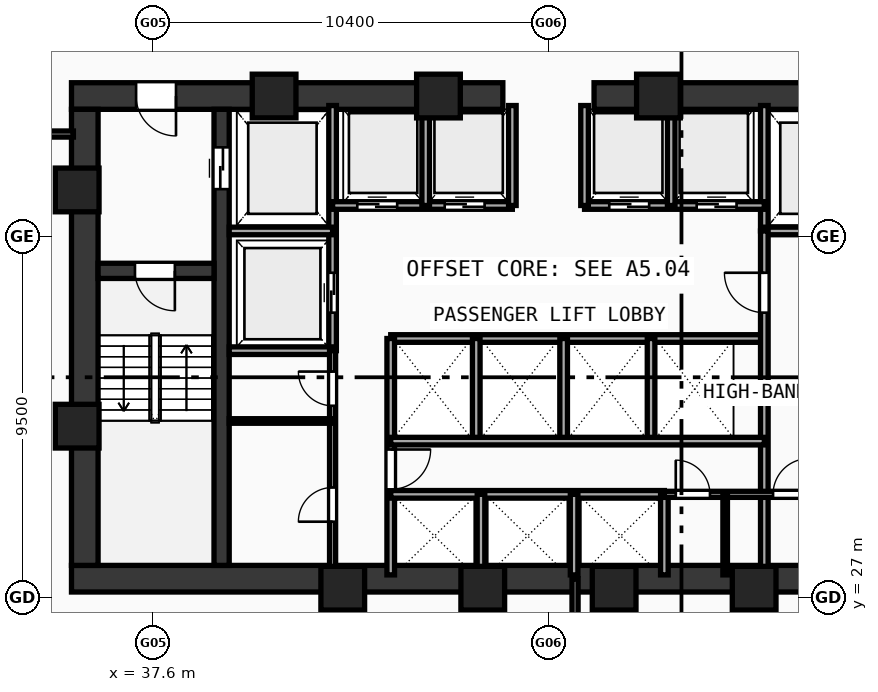
"""IFC4 building model, lengths in metres.
Left out: names, types, materials, properties, quantities, classifications, styles, units other than length and angle.
Written with IfcOpenShell. Run it as: python <this file> out.ifc"""

import sys

from ifc_helpers import new_model, si_unit, direction, frame, frame_2d, origin, origin_with_axes, origin_2d, place, context, subcontext, project, spatial, rectangle, hollow_rectangle, extrude, source, transform, mapped, element, fill, save


model = new_model("IFC4")
c1 = context("Model", 3, precision=1e-05, world=origin(), true_north=direction((0.0, 1.0)))
c2 = subcontext(c1, "Body", "Model", "MODEL_VIEW")
j1 = project(units=[si_unit("LENGTHUNIT", "METRE"), si_unit("PLANEANGLEUNIT", "RADIAN")], contexts=[c1])
p1 = place(None, origin())
s1 = spatial("IfcSite", under=j1, at=p1, CompositionType="ELEMENT")
p2 = place(p1, origin())
s2 = spatial("IfcBuilding", under=s1, at=p2, CompositionType="ELEMENT")
p3 = place(p2, frame((0.0, 0.0, 19.2)))
s3 = spatial("IfcBuildingStorey", under=s2, at=p3, CompositionType="ELEMENT", Elevation=19.2)
p4 = place(p3, frame((35.45, 27.5, 0.0), z_axis=(0.0, 0.0, 1.0), x_axis=(1.0, 0.0, 0.0)))
e1 = element("IfcWall", 1, at=p4, inside=s3, PredefinedType="SHEAR", context=c2, shape_type="SweptSolid", body=[
    extrude(rectangle(XDim=25.1, YDim=0.7, at=frame_2d((12.55, 0.0))), origin(), (0.0, 0.0, 1.0), 5.92),
])
p5 = place(p3, frame((35.45, 40.2, 0.0), z_axis=(0.0, 0.0, 1.0), x_axis=(1.0, 0.0, 0.0)))
e2 = element("IfcWall", 2, at=p5, inside=s3, PredefinedType="SHEAR", context=c2, shape_type="SweptSolid", body=[
    extrude(rectangle(XDim=11.35, YDim=0.7, at=frame_2d((5.675, 0.0))), origin(), (0.0, 0.0, 1.0), 5.92),
])
p6 = place(p5, frame((1.7, 0.0, 0.0)))
e3 = element("IfcOpeningElement", 3, at=p6, cuts=e2, PredefinedType="OPENING", context=c2, shape_type="SweptSolid", body=[
    extrude(rectangle(XDim=1.05, YDim=2.1, at=frame_2d((0.525, 1.05))), frame((0.0, 0.36, 0.0), z_axis=(0.0, -1.0, 0.0), x_axis=(1.0, 0.0, 0.0)), (0.0, 0.0, 1.0), 0.72),
])
p7 = place(p3, frame((49.2, 40.2, 0.0), z_axis=(0.0, 0.0, 1.0), x_axis=(1.0, 0.0, 0.0)))
e4 = element("IfcWall", 4, at=p7, inside=s3, PredefinedType="SHEAR", context=c2, shape_type="SweptSolid", body=[
    extrude(rectangle(XDim=11.35, YDim=0.7, at=frame_2d((5.675, 0.0))), origin(), (0.0, 0.0, 1.0), 5.92),
])
p8 = place(p7, frame((8.6, 0.0, 0.0)))
e5 = element("IfcOpeningElement", 5, at=p8, cuts=e4, PredefinedType="OPENING", context=c2, shape_type="SweptSolid", body=[
    extrude(rectangle(XDim=1.05, YDim=2.1, at=frame_2d((0.525, 1.05))), frame((0.0, 0.36, 0.0), z_axis=(0.0, -1.0, 0.0), x_axis=(1.0, 0.0, 0.0)), (0.0, 0.0, 1.0), 0.72),
])
p9 = place(p3, frame((35.8, 27.85, 0.0), z_axis=(0.0, 0.0, 1.0), x_axis=(0.0, 1.0, 0.0)))
e6 = element("IfcWall", 6, at=p9, inside=s3, PredefinedType="SHEAR", context=c2, shape_type="SweptSolid", body=[
    extrude(rectangle(XDim=12.0, YDim=0.7, at=frame_2d((6.0, 0.0))), origin(), (0.0, 0.0, 1.0), 5.92),
])
p10 = place(p3, frame((39.4, 27.85, 0.0), z_axis=(0.0, 0.0, 1.0), x_axis=(0.0, 1.0, 0.0)))
e7 = element("IfcWall", 7, at=p10, inside=s3, PredefinedType="SHEAR", context=c2, shape_type="SweptSolid", body=[
    extrude(rectangle(XDim=12.0, YDim=0.4, at=frame_2d((6.0, 0.0))), origin(), (0.0, 0.0, 1.0), 5.92),
])
p11 = place(p10, frame((9.9, 0.0, 0.0)))
e8 = element("IfcOpeningElement", 8, at=p11, cuts=e7, PredefinedType="OPENING", context=c2, shape_type="SweptSolid", body=[
    extrude(rectangle(XDim=1.1, YDim=2.1, at=frame_2d((0.55, 1.05))), frame((0.0, 0.21, 0.0), z_axis=(0.0, -1.0, 0.0), x_axis=(1.0, 0.0, 0.0)), (0.0, 0.0, 1.0), 0.42),
])
p12 = place(p3, frame((36.15, 35.6, 0.0), z_axis=(0.0, 0.0, 1.0), x_axis=(1.0, 0.0, 0.0)))
e9 = element("IfcWall", 9, at=p12, inside=s3, PredefinedType="SHEAR", context=c2, shape_type="SweptSolid", body=[
    extrude(rectangle(XDim=3.05, YDim=0.4, at=frame_2d((1.525, 0.0))), origin(), (0.0, 0.0, 1.0), 5.92),
])
p13 = place(p12, frame((0.97, 0.0, 0.0)))
e10 = element("IfcOpeningElement", 10, at=p13, cuts=e9, PredefinedType="OPENING", context=c2, shape_type="SweptSolid", body=[
    extrude(rectangle(XDim=1.05, YDim=2.1, at=frame_2d((0.525, 1.05))), frame((0.0, 0.21, 0.0), z_axis=(0.0, -1.0, 0.0), x_axis=(1.0, 0.0, 0.0)), (0.0, 0.0, 1.0), 0.42),
])
m1 = source(origin(), c2, "Body", "SweptSolid", [
    extrude(hollow_rectangle(XDim=1.15, YDim=1.15, WallThickness=0.048, at=origin_2d()), origin(), (0.0, 0.0, 1.0), 6.2),
])
for number, where, z_axis, x_axis in (
    (11, (42.588, 27.25, -0.28), (0.0, 0.0, 1.0), (1.0, 0.0, 0.0)),
    (12, (46.272, 27.25, -0.28), (0.0, 0.0, 1.0), (1.0, 0.0, 0.0)),
    (13, (49.729, 27.25, -0.28), (0.0, 0.0, 1.0), (1.0, 0.0, 0.0)),
    (14, (53.412, 27.25, -0.28), (0.0, 0.0, 1.0), (1.0, 0.0, 0.0)),
    (15, (50.894, 40.2, -0.28), (0.0, 0.0, 1.0), (1.0, 0.0, 0.0)),
    (16, (45.106, 40.2, -0.28), (0.0, 0.0, 1.0), (1.0, 0.0, 0.0)),
    (17, (40.781, 40.2, -0.28), (0.0, 0.0, 1.0), (1.0, 0.0, 0.0)),
    (18, (35.6, 37.729, -0.28), (0.0, 0.0, 1.0), (1.0, 0.0, 0.0)),
    (19, (35.6, 31.513, -0.28), (0.0, 0.0, 1.0), (1.0, 0.0, 0.0)),
):
    element("IfcColumn", number, at=place(p3, frame(where, z_axis=z_axis, x_axis=x_axis)), inside=s3, PredefinedType="COLUMN", context=c2, shape_type="MappedRepresentation", body=[
        mapped(m1, transform((0.0, 0.0, 0.0), scale=1.0)),
    ])
p14 = place(p3, frame((42.32, 33.5, 0.0), z_axis=(0.0, 0.0, 1.0), x_axis=(0.0, 1.0, 0.0)))
e20 = element("IfcWall", 20, at=p14, inside=s3, PredefinedType="SOLIDWALL", context=c2, shape_type="SweptSolid", body=[
    extrude(rectangle(XDim=6.45, YDim=0.2, at=frame_2d((3.225, 0.0))), origin(), (0.0, 0.0, 1.0), 5.92),
])
p15 = place(p14, frame((1.0, 0.0, 0.0)))
e21 = element("IfcOpeningElement", 21, at=p15, cuts=e20, PredefinedType="OPENING", context=c2, shape_type="SweptSolid", body=[
    extrude(rectangle(XDim=1.05, YDim=2.1, at=frame_2d((0.525, 1.05))), frame((0.0, 0.11, 0.0), z_axis=(0.0, -1.0, 0.0), x_axis=(1.0, 0.0, 0.0)), (0.0, 0.0, 1.0), 0.22),
])
for number, where, z_axis, x_axis in (
    (22, (39.6, 36.65, 0.0), (0.0, 0.0, 1.0), (1.0, 0.0, 0.0)),
    (23, (39.6, 33.5, 0.0), (0.0, 0.0, 1.0), (1.0, 0.0, 0.0)),
):
    element("IfcWall", number, at=place(p3, frame(where, z_axis=z_axis, x_axis=x_axis)), inside=s3, PredefinedType="SOLIDWALL", context=c2, shape_type="SweptSolid", body=[
        extrude(rectangle(XDim=2.72, YDim=0.2, at=frame_2d((1.36, 0.0))), origin(), (0.0, 0.0, 1.0), 5.92),
    ])
p16 = place(p3, frame((53.68, 36.65, 0.0), z_axis=(0.0, 0.0, 1.0), x_axis=(0.0, 1.0, 0.0)))
e24 = element("IfcWall", 24, at=p16, inside=s3, PredefinedType="SOLIDWALL", context=c2, shape_type="SweptSolid", body=[
    extrude(rectangle(XDim=3.3, YDim=0.2, at=frame_2d((1.65, 0.0))), origin(), (0.0, 0.0, 1.0), 5.92),
])
p17 = place(p3, frame((53.68, 36.65, 0.0), z_axis=(0.0, 0.0, 1.0), x_axis=(1.0, 0.0, 0.0)))
e25 = element("IfcWall", 25, at=p17, inside=s3, PredefinedType="SOLIDWALL", context=c2, shape_type="SweptSolid", body=[
    extrude(rectangle(XDim=2.72, YDim=0.2, at=frame_2d((1.36, 0.0))), origin(), (0.0, 0.0, 1.0), 5.92),
])
p18 = place(p3, frame((42.32, 37.32, 0.0), z_axis=(0.0, 0.0, 1.0), x_axis=(1.0, 0.0, 0.0)))
e26 = element("IfcWall", 26, at=p18, inside=s3, PredefinedType="SOLIDWALL", context=c2, shape_type="SweptSolid", body=[
    extrude(rectangle(XDim=4.73, YDim=0.2, at=frame_2d((2.365, 0.0))), origin(), (0.0, 0.0, 1.0), 5.92),
])
p19 = place(p18, frame((0.65, 0.0, 0.0)))
e27 = element("IfcOpeningElement", 27, at=p19, cuts=e26, PredefinedType="OPENING", context=c2, shape_type="SweptSolid", body=[
    extrude(rectangle(XDim=1.05, YDim=2.1, at=frame_2d((0.525, 1.05))), frame((0.0, 0.11, 0.0), z_axis=(0.0, -1.0, 0.0), x_axis=(1.0, 0.0, 0.0)), (0.0, 0.0, 1.0), 0.22),
])
p20 = place(p18, frame((2.95, 0.0, 0.0)))
e28 = element("IfcOpeningElement", 28, at=p20, cuts=e26, PredefinedType="OPENING", context=c2, shape_type="SweptSolid", body=[
    extrude(rectangle(XDim=1.05, YDim=2.1, at=frame_2d((0.525, 1.05))), frame((0.0, 0.11, 0.0), z_axis=(0.0, -1.0, 0.0), x_axis=(1.0, 0.0, 0.0)), (0.0, 0.0, 1.0), 0.22),
])
p21 = place(p3, frame((48.95, 37.32, 0.0), z_axis=(0.0, 0.0, 1.0), x_axis=(1.0, 0.0, 0.0)))
e29 = element("IfcWall", 29, at=p21, inside=s3, PredefinedType="SOLIDWALL", context=c2, shape_type="SweptSolid", body=[
    extrude(rectangle(XDim=4.73, YDim=0.2, at=frame_2d((2.365, 0.0))), origin(), (0.0, 0.0, 1.0), 5.92),
])
p22 = place(p21, frame((0.65, 0.0, 0.0)))
e30 = element("IfcOpeningElement", 30, at=p22, cuts=e29, PredefinedType="OPENING", context=c2, shape_type="SweptSolid", body=[
    extrude(rectangle(XDim=1.05, YDim=2.1, at=frame_2d((0.525, 1.05))), frame((0.0, 0.11, 0.0), z_axis=(0.0, -1.0, 0.0), x_axis=(1.0, 0.0, 0.0)), (0.0, 0.0, 1.0), 0.22),
])
p23 = place(p21, frame((2.95, 0.0, 0.0)))
e31 = element("IfcOpeningElement", 31, at=p23, cuts=e29, PredefinedType="OPENING", context=c2, shape_type="SweptSolid", body=[
    extrude(rectangle(XDim=1.05, YDim=2.1, at=frame_2d((0.525, 1.05))), frame((0.0, 0.11, 0.0), z_axis=(0.0, -1.0, 0.0), x_axis=(1.0, 0.0, 0.0)), (0.0, 0.0, 1.0), 0.22),
])
for number, where, z_axis, x_axis in (
    (32, (47.05, 37.32, 0.0), (0.0, 0.0, 1.0), (0.0, 1.0, 0.0)),
    (33, (48.95, 37.32, 0.0), (0.0, 0.0, 1.0), (0.0, 1.0, 0.0)),
):
    element("IfcWall", number, at=place(p3, frame(where, z_axis=z_axis, x_axis=x_axis)), inside=s3, PredefinedType="SOLIDWALL", context=c2, shape_type="SweptSolid", body=[
        extrude(rectangle(XDim=2.63, YDim=0.2, at=frame_2d((1.315, 0.0))), origin(), (0.0, 0.0, 1.0), 5.92),
    ])
for number, where, z_axis, x_axis in (
    (34, (44.77, 37.32, 0.0), (0.0, 0.0, 1.0), (0.0, 1.0, 0.0)),
    (35, (51.23, 37.32, 0.0), (0.0, 0.0, 1.0), (0.0, 1.0, 0.0)),
):
    element("IfcWall", number, at=place(p3, frame(where, z_axis=z_axis, x_axis=x_axis)), inside=s3, PredefinedType="SOLIDWALL", context=c2, shape_type="SweptSolid", body=[
        extrude(rectangle(XDim=2.63, YDim=0.2, at=frame_2d((1.315, 0.0))), origin(), (0.0, 0.0, 1.0), 2.42),
    ])
p24 = place(p3, frame((43.85, 33.82, 0.0), z_axis=(0.0, 0.0, 1.0), x_axis=(1.0, 0.0, 0.0)))
e36 = element("IfcWall", 36, at=p24, inside=s3, PredefinedType="SOLIDWALL", context=c2, shape_type="SweptSolid", body=[
    extrude(rectangle(XDim=9.83, YDim=0.2, at=frame_2d((4.915, 0.0))), origin(), (0.0, 0.0, 1.0), 5.92),
])
p25 = place(p3, frame((43.85, 27.6, 0.0), z_axis=(0.0, 0.0, 1.0), x_axis=(0.0, 1.0, 0.0)))
e37 = element("IfcWall", 37, at=p25, inside=s3, PredefinedType="SOLIDWALL", context=c2, shape_type="SweptSolid", body=[
    extrude(rectangle(XDim=6.22, YDim=0.2, at=frame_2d((3.11, 0.0))), origin(), (0.0, 0.0, 1.0), 5.92),
])
p26 = place(p25, frame((2.25, 0.0, 0.0)))
e38 = element("IfcOpeningElement", 38, at=p26, cuts=e37, PredefinedType="OPENING", context=c2, shape_type="SweptSolid", body=[
    extrude(rectangle(XDim=1.05, YDim=2.1, at=frame_2d((0.525, 1.05))), frame((0.0, 0.11, 0.0), z_axis=(0.0, -1.0, 0.0), x_axis=(1.0, 0.0, 0.0)), (0.0, 0.0, 1.0), 0.22),
])
p27 = place(p3, frame((53.68, 27.6, 0.0), z_axis=(0.0, 0.0, 1.0), x_axis=(0.0, 1.0, 0.0)))
e39 = element("IfcWall", 39, at=p27, inside=s3, PredefinedType="SOLIDWALL", context=c2, shape_type="SweptSolid", body=[
    extrude(rectangle(XDim=9.05, YDim=0.2, at=frame_2d((4.525, 0.0))), origin(), (0.0, 0.0, 1.0), 2.42),
])
p28 = place(p27, frame((6.9, 0.0, 0.0)))
e40 = element("IfcOpeningElement", 40, at=p28, cuts=e39, PredefinedType="OPENING", context=c2, shape_type="SweptSolid", body=[
    extrude(rectangle(XDim=1.05, YDim=2.1, at=frame_2d((0.525, 1.05))), frame((0.0, 0.11, 0.0), z_axis=(0.0, -1.0, 0.0), x_axis=(1.0, 0.0, 0.0)), (0.0, 0.0, 1.0), 0.22),
])
for number, where, z_axis, x_axis in (
    (41, (46.1, 31.12, 0.0), (0.0, 0.0, 1.0), (0.0, 1.0, 0.0)),
    (42, (48.4, 31.12, 0.0), (0.0, 0.0, 1.0), (0.0, 1.0, 0.0)),
    (43, (50.7, 31.12, 0.0), (0.0, 0.0, 1.0), (0.0, 1.0, 0.0)),
):
    element("IfcWall", number, at=place(p3, frame(where, z_axis=z_axis, x_axis=x_axis)), inside=s3, PredefinedType="SOLIDWALL", context=c2, shape_type="SweptSolid", body=[
        extrude(rectangle(XDim=2.7, YDim=0.2, at=frame_2d((1.35, 0.0))), origin(), (0.0, 0.0, 1.0), 5.92),
    ])
p29 = place(p3, frame((43.85, 29.72, 0.0), z_axis=(0.0, 0.0, 1.0), x_axis=(1.0, 0.0, 0.0)))
e44 = element("IfcWall", 44, at=p29, inside=s3, PredefinedType="SOLIDWALL", context=c2, shape_type="SweptSolid", body=[
    extrude(rectangle(XDim=7.2, YDim=0.2, at=frame_2d((3.6, 0.0))), origin(), (0.0, 0.0, 1.0), 5.92),
])
p30 = place(p3, frame((51.05, 27.6, 0.0), z_axis=(0.0, 0.0, 1.0), x_axis=(0.0, 1.0, 0.0)))
e45 = element("IfcWall", 45, at=p30, inside=s3, PredefinedType="SOLIDWALL", context=c2, shape_type="SweptSolid", body=[
    extrude(rectangle(XDim=2.12, YDim=0.2, at=frame_2d((1.06, 0.0))), origin(), (0.0, 0.0, 1.0), 5.92),
])
p31 = place(p3, frame((43.85, 31.12, 0.0), z_axis=(0.0, 0.0, 1.0), x_axis=(1.0, 0.0, 0.0)))
e46 = element("IfcWall", 46, at=p31, inside=s3, PredefinedType="SOLIDWALL", context=c2, shape_type="SweptSolid", body=[
    extrude(rectangle(XDim=9.83, YDim=0.2, at=frame_2d((4.915, 0.0))), origin(), (0.0, 0.0, 1.0), 5.92),
])
p32 = place(p3, frame((46.225, 27.6, 0.0), z_axis=(0.0, 0.0, 1.0), x_axis=(0.0, 1.0, 0.0)))
e47 = element("IfcWall", 47, at=p32, inside=s3, PredefinedType="SOLIDWALL", context=c2, shape_type="SweptSolid", body=[
    extrude(rectangle(XDim=2.12, YDim=0.2, at=frame_2d((1.06, 0.0))), origin(), (0.0, 0.0, 1.0), 2.42),
])
p33 = place(p3, frame((48.675, 27.6, 0.0), z_axis=(0.0, 0.0, 1.0), x_axis=(0.0, 1.0, 0.0)))
e48 = element("IfcWall", 48, at=p33, inside=s3, PredefinedType="SOLIDWALL", context=c2, shape_type="SweptSolid", body=[
    extrude(rectangle(XDim=2.12, YDim=0.2, at=frame_2d((1.06, 0.0))), origin(), (0.0, 0.0, 1.0), 5.92),
])
p34 = place(p3, frame((42.32, 27.6, 0.0), z_axis=(0.0, 0.0, 1.0), x_axis=(0.0, 1.0, 0.0)))
e49 = element("IfcWall", 49, at=p34, inside=s3, PredefinedType="PARTITIONING", context=c2, shape_type="SweptSolid", body=[
    extrude(rectangle(XDim=5.9, YDim=0.16, at=frame_2d((2.95, 0.0))), origin(), (0.0, 0.0, 1.0), 2.42),
])
p35 = place(p34, frame((1.4, 0.0, 0.0)))
e50 = element("IfcOpeningElement", 50, at=p35, cuts=e49, PredefinedType="OPENING", context=c2, shape_type="SweptSolid", body=[
    extrude(rectangle(XDim=0.9, YDim=2.1, at=frame_2d((0.45, 1.05))), frame((0.0, 0.09, 0.0), z_axis=(0.0, -1.0, 0.0), x_axis=(1.0, 0.0, 0.0)), (0.0, 0.0, 1.0), 0.18),
])
p36 = place(p34, frame((4.45, 0.0, 0.0)))
e51 = element("IfcOpeningElement", 51, at=p36, cuts=e49, PredefinedType="OPENING", context=c2, shape_type="SweptSolid", body=[
    extrude(rectangle(XDim=0.9, YDim=2.1, at=frame_2d((0.45, 1.05))), frame((0.0, 0.09, 0.0), z_axis=(0.0, -1.0, 0.0), x_axis=(1.0, 0.0, 0.0)), (0.0, 0.0, 1.0), 0.18),
])
p37 = place(p3, frame((51.05, 29.72, 0.0), z_axis=(0.0, 0.0, 1.0), x_axis=(1.0, 0.0, 0.0)))
e52 = element("IfcWall", 52, at=p37, inside=s3, PredefinedType="PARTITIONING", context=c2, shape_type="SweptSolid", body=[
    extrude(rectangle(XDim=4.07, YDim=0.16, at=frame_2d((2.035, 0.0))), origin(), (0.0, 0.0, 1.0), 5.92),
])
p38 = place(p37, frame((0.3, 0.0, 0.0)))
e53 = element("IfcOpeningElement", 53, at=p38, cuts=e52, PredefinedType="OPENING", context=c2, shape_type="SweptSolid", body=[
    extrude(rectangle(XDim=0.9, YDim=2.1, at=frame_2d((0.45, 1.05))), frame((0.0, 0.09, 0.0), z_axis=(0.0, -1.0, 0.0), x_axis=(1.0, 0.0, 0.0)), (0.0, 0.0, 1.0), 0.18),
])
p39 = place(p37, frame((2.86, 0.0, 0.0)))
e54 = element("IfcOpeningElement", 54, at=p39, cuts=e52, PredefinedType="OPENING", context=c2, shape_type="SweptSolid", body=[
    extrude(rectangle(XDim=0.94, YDim=2.1, at=frame_2d((0.47, 1.05))), frame((0.0, 0.09, 0.0), z_axis=(0.0, -1.0, 0.0), x_axis=(1.0, 0.0, 0.0)), (0.0, 0.0, 1.0), 0.18),
])
p40 = place(p3, frame((39.6, 31.65, 0.0), z_axis=(0.0, 0.0, 1.0), x_axis=(1.0, 0.0, 0.0)))
e55 = element("IfcWall", 55, at=p40, inside=s3, PredefinedType="PARTITIONING", context=c2, shape_type="SweptSolid", body=[
    extrude(rectangle(XDim=2.72, YDim=0.12, at=frame_2d((1.36, 0.0))), origin(), (0.0, 0.0, 1.0), 5.92),
])
p41 = place(p3, frame((52.65, 27.6, 0.0), z_axis=(0.0, 0.0, 1.0), x_axis=(0.0, 1.0, 0.0)))
e56 = element("IfcWall", 56, at=p41, inside=s3, PredefinedType="PARTITIONING", context=c2, shape_type="SweptSolid", body=[
    extrude(rectangle(XDim=2.12, YDim=0.12, at=frame_2d((1.06, 0.0))), origin(), (0.0, 0.0, 1.0), 5.92),
])
p42 = place(p3, frame((32.7, 39.2, 0.0), z_axis=(0.0, 0.0, 1.0), x_axis=(1.0, 0.0, 0.0)))
e57 = element("IfcWall", 57, at=p42, inside=s3, PredefinedType="PARTITIONING", context=c2, shape_type="SweptSolid", body=[
    extrude(rectangle(XDim=2.8, YDim=0.16, at=frame_2d((1.4, 0.0))), origin(), (0.0, 0.0, 1.0), 2.42),
])
p43 = place(p3, frame((48.7, 12.45, 0.0), z_axis=(0.0, 0.0, 1.0), x_axis=(0.0, 1.0, 0.0)))
e58 = element("IfcWall", 58, at=p43, inside=s3, PredefinedType="PARTITIONING", context=c2, shape_type="SweptSolid", body=[
    extrude(rectangle(XDim=15.05, YDim=0.16, at=frame_2d((7.525, 0.0))), origin(), (0.0, 0.0, 1.0), 5.22),
])
m2 = source(origin(), c2, "Body", "SweptSolid", [
    extrude(rectangle(XDim=1.05, YDim=2.1, at=frame_2d((0.525, 1.05))), frame((0.0, 0.025, 0.0), z_axis=(0.0, -1.0, 0.0), x_axis=(1.0, 0.0, 0.0)), (0.0, 0.0, 1.0), 0.05),
])
p44 = place(p13, frame((1.05, 0.0, 0.0), z_axis=(0.0, 0.0, 1.0), x_axis=(-1.0, 0.0, 0.0)))
e59 = element("IfcDoor", 59, at=p44, inside=s3, OperationType="SINGLE_SWING_LEFT", PredefinedType="DOOR", context=c2, shape_type="MappedRepresentation", body=[
    mapped(m2, transform((0.0, 0.0, 0.0), scale=1.0)),
])
fill(e10, e59)
p45 = place(p6, frame((1.05, 0.0, 0.0), z_axis=(0.0, 0.0, 1.0), x_axis=(-1.0, 0.0, 0.0)))
e60 = element("IfcDoor", 60, at=p45, inside=s3, OperationType="SINGLE_SWING_LEFT", PredefinedType="DOOR", context=c2, shape_type="MappedRepresentation", body=[
    mapped(m2, transform((0.0, 0.0, 0.0), scale=1.0)),
])
fill(e3, e60)
m3 = source(origin(), c2, "Body", "SweptSolid", [
    extrude(rectangle(XDim=1.1, YDim=2.1, at=frame_2d((0.55, 1.05))), frame((0.0, 0.025, 0.0), z_axis=(0.0, -1.0, 0.0), x_axis=(1.0, 0.0, 0.0)), (0.0, 0.0, 1.0), 0.05),
])
p46 = place(p11, frame((1.1, 0.0, 0.0), z_axis=(0.0, 0.0, 1.0), x_axis=(-1.0, 0.0, 0.0)))
e61 = element("IfcDoor", 61, at=p46, inside=s3, OperationType="DOUBLE_DOOR_SLIDING", PredefinedType="DOOR", context=c2, shape_type="MappedRepresentation", body=[
    mapped(m3, transform((0.0, 0.0, 0.0), scale=1.0)),
])
fill(e8, e61)
p47 = place(p15, origin_with_axes())
e62 = element("IfcDoor", 62, at=p47, inside=s3, OperationType="DOUBLE_DOOR_SLIDING", PredefinedType="DOOR", context=c2, shape_type="MappedRepresentation", body=[
    mapped(m2, transform((0.0, 0.0, 0.0), scale=1.0)),
])
fill(e21, e62)
p48 = place(p19, frame((1.05, 0.0, 0.0), z_axis=(0.0, 0.0, 1.0), x_axis=(-1.0, 0.0, 0.0)))
e63 = element("IfcDoor", 63, at=p48, inside=s3, OperationType="DOUBLE_DOOR_SLIDING", PredefinedType="DOOR", context=c2, shape_type="MappedRepresentation", body=[
    mapped(m2, transform((0.0, 0.0, 0.0), scale=1.0)),
])
fill(e27, e63)
p49 = place(p20, frame((1.05, 0.0, 0.0), z_axis=(0.0, 0.0, 1.0), x_axis=(-1.0, 0.0, 0.0)))
e64 = element("IfcDoor", 64, at=p49, inside=s3, OperationType="DOUBLE_DOOR_SLIDING", PredefinedType="DOOR", context=c2, shape_type="MappedRepresentation", body=[
    mapped(m2, transform((0.0, 0.0, 0.0), scale=1.0)),
])
fill(e28, e64)
p50 = place(p22, frame((1.05, 0.0, 0.0), z_axis=(0.0, 0.0, 1.0), x_axis=(-1.0, 0.0, 0.0)))
e65 = element("IfcDoor", 65, at=p50, inside=s3, OperationType="DOUBLE_DOOR_SLIDING", PredefinedType="DOOR", context=c2, shape_type="MappedRepresentation", body=[
    mapped(m2, transform((0.0, 0.0, 0.0), scale=1.0)),
])
fill(e30, e65)
p51 = place(p23, frame((1.05, 0.0, 0.0), z_axis=(0.0, 0.0, 1.0), x_axis=(-1.0, 0.0, 0.0)))
e66 = element("IfcDoor", 66, at=p51, inside=s3, OperationType="DOUBLE_DOOR_SLIDING", PredefinedType="DOOR", context=c2, shape_type="MappedRepresentation", body=[
    mapped(m2, transform((0.0, 0.0, 0.0), scale=1.0)),
])
fill(e31, e66)
p52 = place(p26, frame((1.05, 0.0, 0.0), z_axis=(0.0, 0.0, 1.0), x_axis=(-1.0, 0.0, 0.0)))
e67 = element("IfcDoor", 67, at=p52, inside=s3, OperationType="SINGLE_SWING_LEFT", PredefinedType="DOOR", context=c2, shape_type="MappedRepresentation", body=[
    mapped(m2, transform((0.0, 0.0, 0.0), scale=1.0)),
])
fill(e38, e67)
p53 = place(p28, origin_with_axes())
e68 = element("IfcDoor", 68, at=p53, inside=s3, OperationType="SINGLE_SWING_RIGHT", PredefinedType="DOOR", context=c2, shape_type="MappedRepresentation", body=[
    mapped(m2, transform((0.0, 0.0, 0.0), scale=1.0)),
])
fill(e40, e68)
m4 = source(origin(), c2, "Body", "SweptSolid", [
    extrude(rectangle(XDim=0.9, YDim=2.1, at=frame_2d((0.45, 1.05))), frame((0.0, 0.025, 0.0), z_axis=(0.0, -1.0, 0.0), x_axis=(1.0, 0.0, 0.0)), (0.0, 0.0, 1.0), 0.05),
])
p54 = place(p35, origin_with_axes())
e69 = element("IfcDoor", 69, at=p54, inside=s3, OperationType="SINGLE_SWING_LEFT", PredefinedType="DOOR", context=c2, shape_type="MappedRepresentation", body=[
    mapped(m4, transform((0.0, 0.0, 0.0), scale=1.0)),
])
fill(e50, e69)
p55 = place(p36, origin_with_axes())
e70 = element("IfcDoor", 70, at=p55, inside=s3, OperationType="SINGLE_SWING_RIGHT", PredefinedType="DOOR", context=c2, shape_type="MappedRepresentation", body=[
    mapped(m4, transform((0.0, 0.0, 0.0), scale=1.0)),
])
fill(e51, e70)
p56 = place(p38, origin_with_axes())
e71 = element("IfcDoor", 71, at=p56, inside=s3, OperationType="SINGLE_SWING_LEFT", PredefinedType="DOOR", context=c2, shape_type="MappedRepresentation", body=[
    mapped(m4, transform((0.0, 0.0, 0.0), scale=1.0)),
])
fill(e53, e71)
m5 = source(origin(), c2, "Body", "SweptSolid", [
    extrude(rectangle(XDim=0.94, YDim=2.1, at=frame_2d((0.47, 1.05))), frame((0.0, 0.025, 0.0), z_axis=(0.0, -1.0, 0.0), x_axis=(1.0, 0.0, 0.0)), (0.0, 0.0, 1.0), 0.05),
])
p57 = place(p39, origin_with_axes())
e72 = element("IfcDoor", 72, at=p57, inside=s3, OperationType="SINGLE_SWING_RIGHT", PredefinedType="DOOR", context=c2, shape_type="MappedRepresentation", body=[
    mapped(m5, transform((0.0, 0.0, 0.0), scale=1.0)),
])
fill(e54, e72)
save(model, sys.argv[1])
